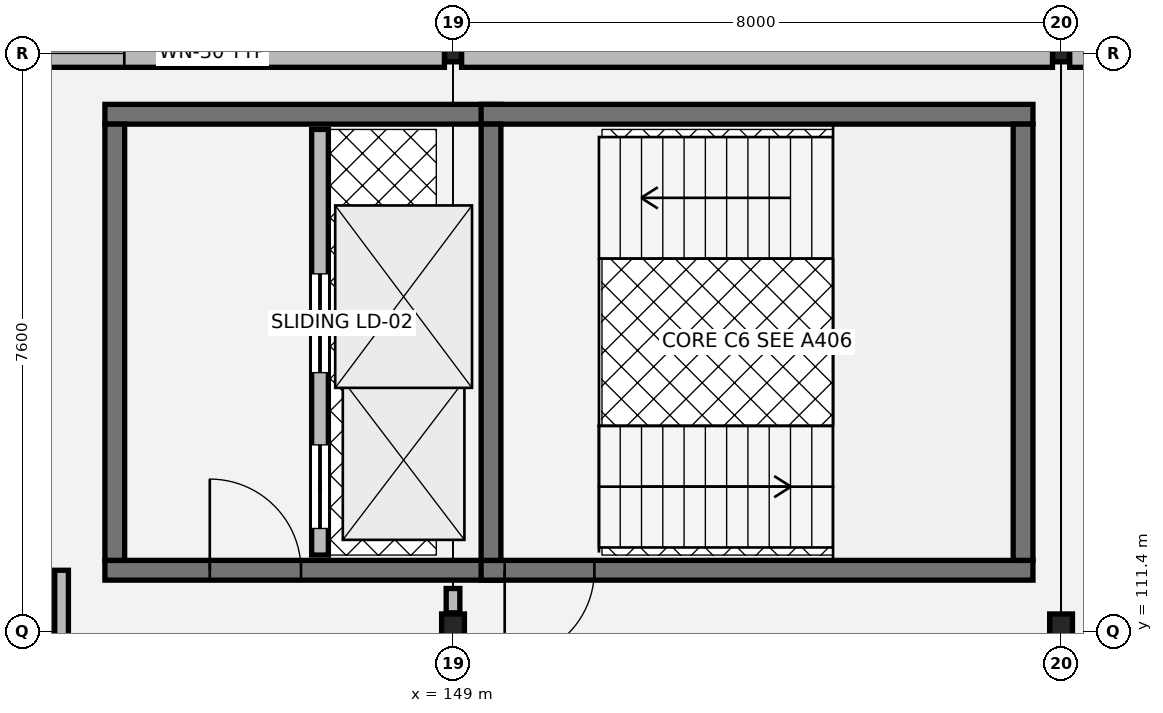
"""IFC4 building model, lengths in metres.
Left out: names, types, materials, properties, quantities, classifications, styles, units other than length and angle.
Written with IfcOpenShell. Run it as: python <this file> out.ifc"""

import sys

from ifc_helpers import new_model, si_unit, direction, frame, frame_2d, origin, origin_2d, place, context, subcontext, project, spatial, rectangle, hollow_rectangle, i_section, extrude, element, fill, save


model = new_model("IFC4")
c1 = context("Model", 3, precision=1e-05, world=origin(), true_north=direction((0.0, 1.0)))
c2 = subcontext(c1, "Body", "Model", "MODEL_VIEW")
j1 = project(units=[si_unit("LENGTHUNIT", "METRE"), si_unit("PLANEANGLEUNIT", "RADIAN")], contexts=[c1])
p1 = place(None, origin())
s1 = spatial("IfcSite", under=j1, at=p1, CompositionType="ELEMENT")
p2 = place(p1, origin())
s2 = spatial("IfcBuilding", under=s1, at=p2, CompositionType="ELEMENT")
p3 = place(p2, frame((0.0, 0.0, 13.26)))
s3 = spatial("IfcBuildingStorey", under=s2, at=p3, CompositionType="ELEMENT", Elevation=13.26)
p4 = place(p3, frame((149.0, 111.4, 0.0), z_axis=(0.0, 0.0, 1.0), x_axis=(1.0, 0.0, 0.0)))
e1 = element("IfcColumn", 1, at=p4, inside=s3, PredefinedType="COLUMN", context=c2, shape_type="SweptSolid", body=[
    extrude(i_section(OverallWidth=0.3, OverallDepth=0.45, WebThickness=0.014, FlangeThickness=0.026, at=origin_2d()), origin(), (0.0, 0.0, 1.0), 4.055),
])
p5 = place(p3, frame((149.0, 119.0, 0.0), z_axis=(0.0, 0.0, 1.0), x_axis=(1.0, 0.0, 0.0)))
e2 = element("IfcColumn", 2, at=p5, inside=s3, PredefinedType="COLUMN", context=c2, shape_type="SweptSolid", body=[
    extrude(hollow_rectangle(XDim=0.22, YDim=0.22, WallThickness=0.01, at=origin_2d()), origin(), (0.0, 0.0, 1.0), 4.055),
])
p6 = place(p3, frame((157.0, 111.4, 0.0), z_axis=(0.0, 0.0, 1.0), x_axis=(1.0, 0.0, 0.0)))
e3 = element("IfcColumn", 3, at=p6, inside=s3, PredefinedType="COLUMN", context=c2, shape_type="SweptSolid", body=[
    extrude(i_section(OverallWidth=0.3, OverallDepth=0.45, WebThickness=0.014, FlangeThickness=0.026, at=origin_2d()), origin(), (0.0, 0.0, 1.0), 4.055),
])
p7 = place(p3, frame((157.0, 119.0, 0.0), z_axis=(0.0, 0.0, 1.0), x_axis=(1.0, 0.0, 0.0)))
e4 = element("IfcColumn", 4, at=p7, inside=s3, PredefinedType="COLUMN", context=c2, shape_type="SweptSolid", body=[
    extrude(hollow_rectangle(XDim=0.22, YDim=0.22, WallThickness=0.01, at=origin_2d()), origin(), (0.0, 0.0, 1.0), 4.055),
])
p8 = place(p3, frame((164.887, 119.0, 0.0), z_axis=(0.0, 0.0, 1.0), x_axis=(-1.0, 0.0, 0.0)))
e5 = element("IfcWall", 5, at=p8, inside=s3, PredefinedType="SOLIDWALL", context=c2, shape_type="SweptSolid", body=[
    extrude(rectangle(XDim=7.774, YDim=0.365, at=frame_2d((3.887, 0.0))), origin(), (0.0, 0.0, 1.0), 3.48),
])
p9 = place(p8, frame((2.612, 0.0, 0.8)))
e6 = element("IfcOpeningElement", 6, at=p9, cuts=e5, PredefinedType="OPENING", context=c2, shape_type="SweptSolid", body=[
    extrude(rectangle(XDim=0.95, YDim=2.0, at=frame_2d((0.475, 1.0))), frame((0.0, 0.192, 0.0), z_axis=(0.0, -1.0, 0.0), x_axis=(1.0, 0.0, 0.0)), (0.0, 0.0, 1.0), 0.385),
])
p10 = place(p8, frame((4.212, 0.0, 0.8)))
e7 = element("IfcOpeningElement", 7, at=p10, cuts=e5, PredefinedType="OPENING", context=c2, shape_type="SweptSolid", body=[
    extrude(rectangle(XDim=0.95, YDim=2.0, at=frame_2d((0.475, 1.0))), frame((0.0, 0.192, 0.0), z_axis=(0.0, -1.0, 0.0), x_axis=(1.0, 0.0, 0.0)), (0.0, 0.0, 1.0), 0.385),
])
p11 = place(p3, frame((156.887, 119.0, 0.0), z_axis=(0.0, 0.0, 1.0), x_axis=(-1.0, 0.0, 0.0)))
e8 = element("IfcWall", 8, at=p11, inside=s3, PredefinedType="SOLIDWALL", context=c2, shape_type="SweptSolid", body=[
    extrude(rectangle(XDim=7.774, YDim=0.365, at=frame_2d((3.887, 0.0))), origin(), (0.0, 0.0, 1.0), 3.48),
])
p12 = place(p3, frame((148.887, 119.0, 0.0), z_axis=(0.0, 0.0, 1.0), x_axis=(-1.0, 0.0, 0.0)))
e9 = element("IfcWall", 9, at=p12, inside=s3, PredefinedType="SOLIDWALL", context=c2, shape_type="SweptSolid", body=[
    extrude(rectangle(XDim=7.774, YDim=0.365, at=frame_2d((3.887, 0.0))), origin(), (0.0, 0.0, 1.0), 3.48),
])
p13 = place(p12, frame((2.542, 0.0, 0.8)))
e10 = element("IfcOpeningElement", 10, at=p13, cuts=e9, PredefinedType="OPENING", context=c2, shape_type="SweptSolid", body=[
    extrude(rectangle(XDim=1.02, YDim=1.98, at=frame_2d((0.51, 0.99))), frame((0.0, 0.192, 0.0), z_axis=(0.0, -1.0, 0.0), x_axis=(1.0, 0.0, 0.0)), (0.0, 0.0, 1.0), 0.385),
])
p14 = place(p12, frame((4.212, 0.0, 0.8)))
e11 = element("IfcOpeningElement", 11, at=p14, cuts=e9, PredefinedType="OPENING", context=c2, shape_type="SweptSolid", body=[
    extrude(rectangle(XDim=1.02, YDim=1.98, at=frame_2d((0.51, 0.99))), frame((0.0, 0.192, 0.0), z_axis=(0.0, -1.0, 0.0), x_axis=(1.0, 0.0, 0.0)), (0.0, 0.0, 1.0), 0.385),
])
p15 = place(p3, frame((144.42, 112.2, 0.0), z_axis=(0.0, 0.0, 1.0), x_axis=(1.0, 0.0, 0.0)))
e12 = element("IfcWall", 12, at=p15, inside=s3, PredefinedType="SHEAR", context=c2, shape_type="SweptSolid", body=[
    extrude(rectangle(XDim=5.21, YDim=0.26, at=frame_2d((2.605, 0.0))), origin(), (0.0, 0.0, 1.0), 3.845),
])
p16 = place(p15, frame((1.38, 0.0, 0.0)))
e13 = element("IfcOpeningElement", 13, at=p16, cuts=e12, PredefinedType="OPENING", context=c2, shape_type="SweptSolid", body=[
    extrude(rectangle(XDim=1.2, YDim=2.16, at=frame_2d((0.6, 1.08))), frame((0.0, 0.14, 0.0), z_axis=(0.0, -1.0, 0.0), x_axis=(1.0, 0.0, 0.0)), (0.0, 0.0, 1.0), 0.28),
])
p17 = place(p3, frame((149.63, 118.2, 0.0), z_axis=(0.0, 0.0, 1.0), x_axis=(-1.0, 0.0, 0.0)))
e14 = element("IfcWall", 14, at=p17, inside=s3, PredefinedType="SHEAR", context=c2, shape_type="SweptSolid", body=[
    extrude(rectangle(XDim=5.21, YDim=0.26, at=frame_2d((2.605, 0.0))), origin(), (0.0, 0.0, 1.0), 3.845),
])
p18 = place(p3, frame((144.55, 118.07, 0.0), z_axis=(0.0, 0.0, 1.0), x_axis=(0.0, -1.0, 0.0)))
e15 = element("IfcWall", 15, at=p18, inside=s3, PredefinedType="SHEAR", context=c2, shape_type="SweptSolid", body=[
    extrude(rectangle(XDim=5.74, YDim=0.26, at=frame_2d((2.87, 0.0))), origin(), (0.0, 0.0, 1.0), 3.845),
])
p19 = place(p3, frame((147.25, 112.4, 0.0), z_axis=(0.0, 0.0, 1.0), x_axis=(0.0, 1.0, 0.0)))
e16 = element("IfcWall", 16, at=p19, inside=s3, PredefinedType="SOLIDWALL", context=c2, shape_type="SweptSolid", body=[
    extrude(rectangle(XDim=5.6, YDim=0.22, at=frame_2d((2.8, 0.0))), origin(), (0.0, 0.0, 1.0), 3.845),
])
p20 = place(p19, frame((0.35, 0.0, 0.0)))
e17 = element("IfcOpeningElement", 17, at=p20, cuts=e16, PredefinedType="OPENING", context=c2, shape_type="SweptSolid", body=[
    extrude(rectangle(XDim=1.1, YDim=2.15, at=frame_2d((0.55, 1.075))), frame((0.0, 0.12, 0.0), z_axis=(0.0, -1.0, 0.0), x_axis=(1.0, 0.0, 0.0)), (0.0, 0.0, 1.0), 0.24),
])
p21 = place(p19, frame((2.4, 0.0, 0.0)))
e18 = element("IfcOpeningElement", 18, at=p21, cuts=e16, PredefinedType="OPENING", context=c2, shape_type="SweptSolid", body=[
    extrude(rectangle(XDim=1.3, YDim=2.18, at=frame_2d((0.65, 1.09))), frame((0.0, 0.12, 0.0), z_axis=(0.0, -1.0, 0.0), x_axis=(1.0, 0.0, 0.0)), (0.0, 0.0, 1.0), 0.24),
])
p22 = place(p3, frame((149.37, 112.2, 0.0), z_axis=(0.0, 0.0, 1.0), x_axis=(1.0, 0.0, 0.0)))
e19 = element("IfcWall", 19, at=p22, inside=s3, PredefinedType="SHEAR", context=c2, shape_type="SweptSolid", body=[
    extrude(rectangle(XDim=7.26, YDim=0.26, at=frame_2d((3.63, 0.0))), origin(), (0.0, 0.0, 1.0), 3.845),
])
p23 = place(p22, frame((0.31, 0.0, 0.0)))
e20 = element("IfcOpeningElement", 20, at=p23, cuts=e19, PredefinedType="OPENING", context=c2, shape_type="SweptSolid", body=[
    extrude(rectangle(XDim=1.18, YDim=2.18, at=frame_2d((0.59, 1.09))), frame((0.0, 0.14, 0.0), z_axis=(0.0, -1.0, 0.0), x_axis=(1.0, 0.0, 0.0)), (0.0, 0.0, 1.0), 0.28),
])
p24 = place(p3, frame((149.37, 118.2, 0.0), z_axis=(0.0, 0.0, 1.0), x_axis=(1.0, 0.0, 0.0)))
e21 = element("IfcWall", 21, at=p24, inside=s3, PredefinedType="SHEAR", context=c2, shape_type="SweptSolid", body=[
    extrude(rectangle(XDim=7.26, YDim=0.26, at=frame_2d((3.63, 0.0))), origin(), (0.0, 0.0, 1.0), 3.845),
])
for number, where, z_axis, x_axis in (
    (22, (149.5, 112.33, 0.0), (0.0, 0.0, 1.0), (0.0, 1.0, 0.0)),
    (23, (156.5, 112.33, 0.0), (0.0, 0.0, 1.0), (0.0, 1.0, 0.0)),
):
    element("IfcWall", number, at=place(p3, frame(where, z_axis=z_axis, x_axis=x_axis)), inside=s3, PredefinedType="SHEAR", context=c2, shape_type="SweptSolid", body=[
        extrude(rectangle(XDim=5.74, YDim=0.26, at=frame_2d((2.87, 0.0))), origin(), (0.0, 0.0, 1.0), 3.845),
    ])
p25 = place(p3, frame((149.0, 111.64, 0.0), z_axis=(0.0, 0.0, 1.0), x_axis=(0.0, 1.0, 0.0)))
e24 = element("IfcWall", 24, at=p25, inside=s3, PredefinedType="PARTITIONING", context=c2, shape_type="SweptSolid", body=[
    extrude(rectangle(XDim=0.32, YDim=0.18, at=frame_2d((0.16, 0.0))), origin(), (0.0, 0.0, 1.0), 3.18),
])
p26 = place(p3, frame((143.85, 110.76, 0.0), z_axis=(0.0, 0.0, 1.0), x_axis=(0.0, 1.0, 0.0)))
e25 = element("IfcWall", 25, at=p26, inside=s3, PredefinedType="PARTITIONING", context=c2, shape_type="SweptSolid", body=[
    extrude(rectangle(XDim=1.44, YDim=0.18, at=frame_2d((0.72, 0.0))), origin(), (0.0, 0.0, 1.0), 3.18),
])
p27 = place(p13, origin())
e26 = element("IfcWindow", 26, at=p27, inside=s3, PartitioningType="SINGLE_PANEL", PredefinedType="WINDOW", context=c2, shape_type="SweptSolid", body=[
    extrude(rectangle(XDim=1.02, YDim=1.98, at=frame_2d((0.51, 0.99))), frame((0.0, 0.03, 0.0), z_axis=(0.0, -1.0, 0.0), x_axis=(1.0, 0.0, 0.0)), (0.0, 0.0, 1.0), 0.06),
])
fill(e10, e26)
p28 = place(p14, origin())
e27 = element("IfcWindow", 27, at=p28, inside=s3, PartitioningType="SINGLE_PANEL", PredefinedType="WINDOW", context=c2, shape_type="SweptSolid", body=[
    extrude(rectangle(XDim=1.02, YDim=1.98, at=frame_2d((0.51, 0.99))), frame((0.0, 0.03, 0.0), z_axis=(0.0, -1.0, 0.0), x_axis=(1.0, 0.0, 0.0)), (0.0, 0.0, 1.0), 0.06),
])
fill(e11, e27)
p29 = place(p16, origin())
e28 = element("IfcDoor", 28, at=p29, inside=s3, OperationType="SINGLE_SWING_LEFT", PredefinedType="DOOR", context=c2, shape_type="SweptSolid", body=[
    extrude(rectangle(XDim=1.2, YDim=2.16, at=frame_2d((0.6, 1.08))), frame((0.0, 0.025, 0.0), z_axis=(0.0, -1.0, 0.0), x_axis=(1.0, 0.0, 0.0)), (0.0, 0.0, 1.0), 0.05),
])
fill(e13, e28)
p30 = place(p20, origin())
e29 = element("IfcDoor", 29, at=p30, inside=s3, OperationType="SLIDING_TO_LEFT", PredefinedType="DOOR", context=c2, shape_type="SweptSolid", body=[
    extrude(rectangle(XDim=1.1, YDim=2.15, at=frame_2d((0.55, 1.075))), frame((0.0, 0.025, 0.0), z_axis=(0.0, -1.0, 0.0), x_axis=(1.0, 0.0, 0.0)), (0.0, 0.0, 1.0), 0.05),
])
fill(e17, e29)
p31 = place(p21, origin())
e30 = element("IfcDoor", 30, at=p31, inside=s3, OperationType="SLIDING_TO_LEFT", PredefinedType="DOOR", context=c2, shape_type="SweptSolid", body=[
    extrude(rectangle(XDim=1.3, YDim=2.18, at=frame_2d((0.65, 1.09))), frame((0.0, 0.025, 0.0), z_axis=(0.0, -1.0, 0.0), x_axis=(1.0, 0.0, 0.0)), (0.0, 0.0, 1.0), 0.05),
])
fill(e18, e30)
p32 = place(p23, origin())
e31 = element("IfcDoor", 31, at=p32, inside=s3, OperationType="SINGLE_SWING_RIGHT", PredefinedType="DOOR", context=c2, shape_type="SweptSolid", body=[
    extrude(rectangle(XDim=1.18, YDim=2.18, at=frame_2d((0.59, 1.09))), frame((0.0, 0.025, 0.0), z_axis=(0.0, -1.0, 0.0), x_axis=(1.0, 0.0, 0.0)), (0.0, 0.0, 1.0), 0.05),
])
fill(e20, e31)
save(model, sys.argv[1])
